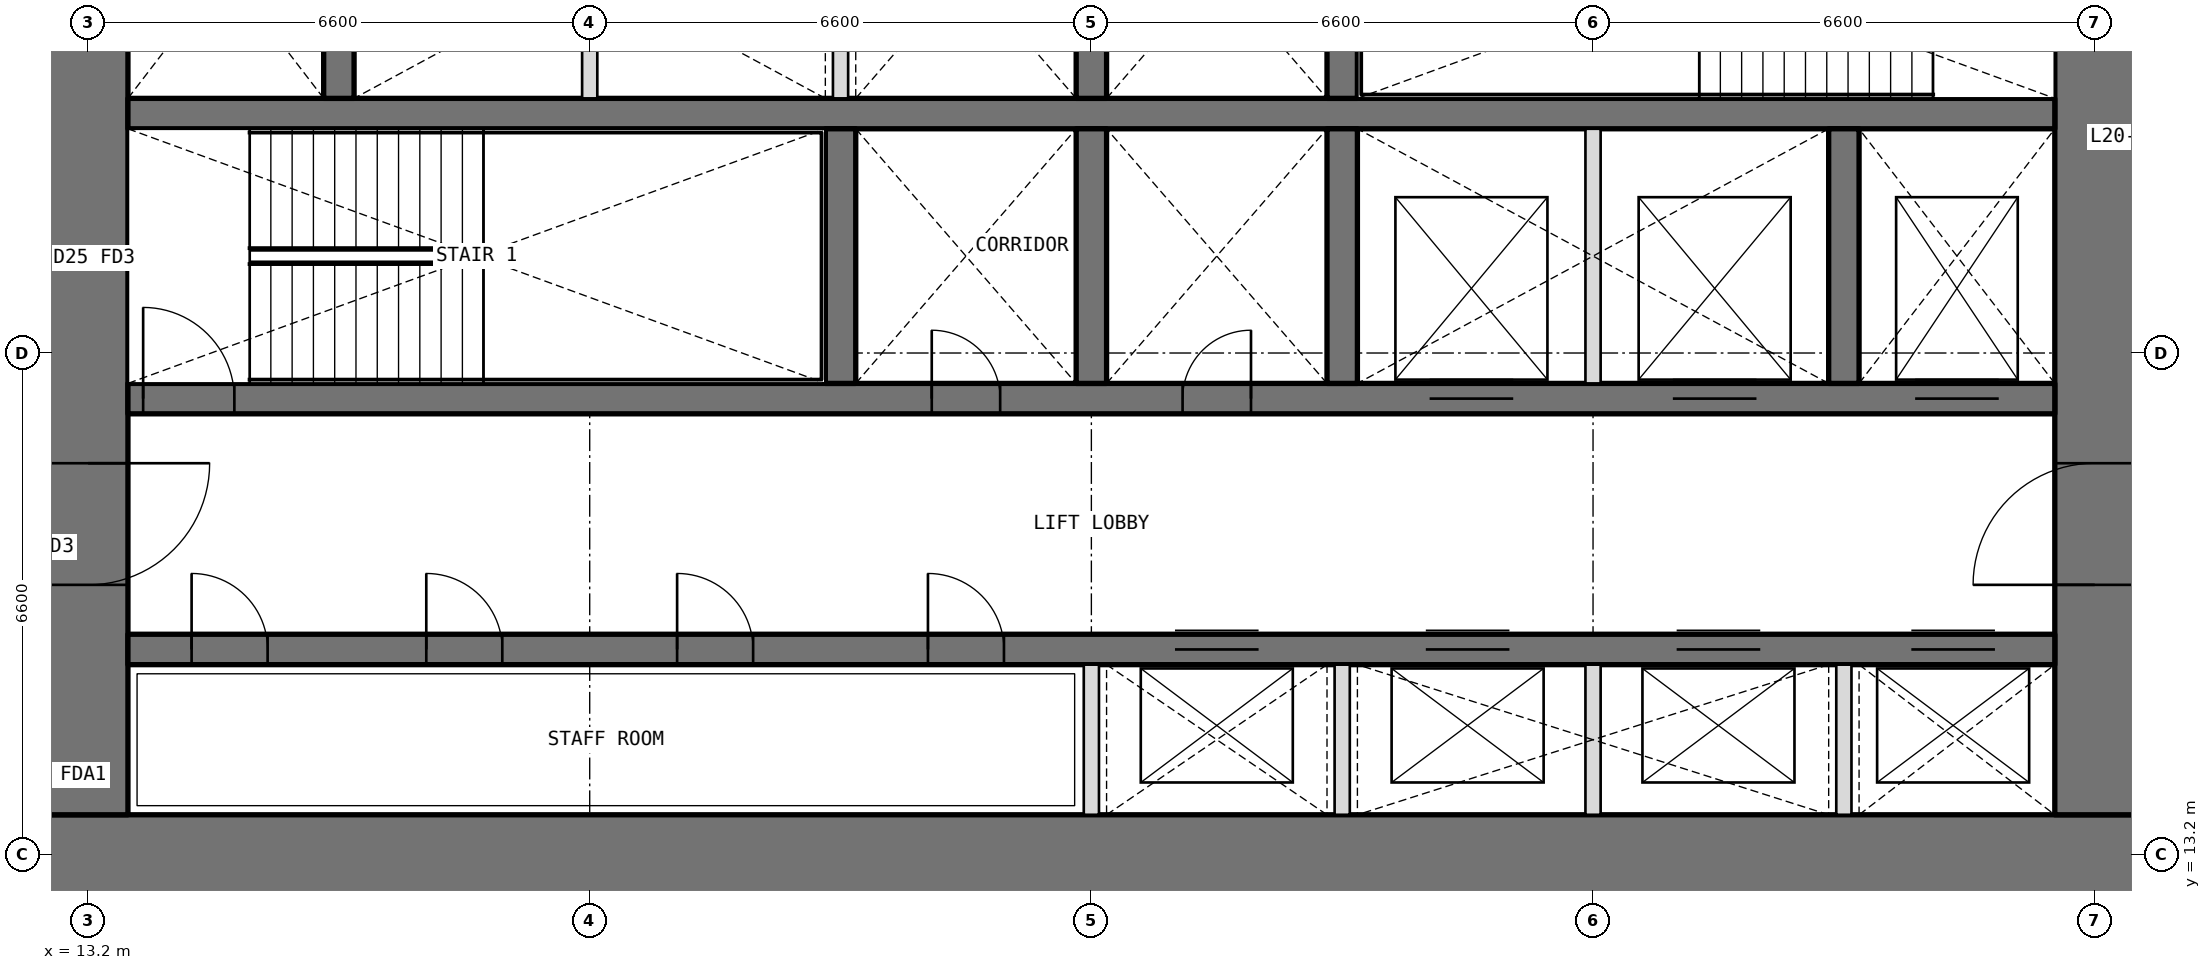
"""IFC4 building model, lengths in metres.
Left out: names, types, materials, properties, quantities, classifications, styles, units other than length and angle.
Written with IfcOpenShell. Run it as: python <this file> out.ifc"""

import sys

from ifc_helpers import new_model, si_unit, direction, frame, frame_2d, origin, place, context, subcontext, project, spatial, rectangle, extrude, element, fill, save


model = new_model("IFC4")
c1 = context("Model", 3, precision=1e-05, world=origin(), true_north=direction((0.0, 1.0)))
c2 = subcontext(c1, "Body", "Model", "MODEL_VIEW")
j1 = project(units=[si_unit("LENGTHUNIT", "METRE"), si_unit("PLANEANGLEUNIT", "RADIAN")], contexts=[c1])
p1 = place(None, origin())
s1 = spatial("IfcSite", under=j1, at=p1, CompositionType="ELEMENT")
p2 = place(p1, origin())
s2 = spatial("IfcBuilding", under=s1, at=p2, CompositionType="ELEMENT")
p3 = place(p2, frame((0.0, 0.0, 90.6)))
s3 = spatial("IfcBuildingStorey", under=s2, at=p3, CompositionType="ELEMENT", Elevation=90.6)
p4 = place(p3, frame((12.675, 13.2, 0.0), z_axis=(0.0, 0.0, 1.0), x_axis=(1.0, 0.0, 0.0)))
e1 = element("IfcWall", 1, at=p4, inside=s3, PredefinedType="SHEAR", context=c2, shape_type="SweptSolid", body=[
    extrude(rectangle(XDim=27.45, YDim=1.05, at=frame_2d((13.725, 0.0))), origin(), (0.0, 0.0, 1.0), 4.2),
])
p5 = place(p3, frame((39.6, 13.725, 0.0), z_axis=(0.0, 0.0, 1.0), x_axis=(0.0, 1.0, 0.0)))
e2 = element("IfcWall", 2, at=p5, inside=s3, PredefinedType="SHEAR", context=c2, shape_type="SweptSolid", body=[
    extrude(rectangle(XDim=18.75, YDim=1.05, at=frame_2d((9.375, 0.0))), origin(), (0.0, 0.0, 1.0), 4.2),
])
p6 = place(p5, frame((3.025, 0.0, 0.0)))
e3 = element("IfcOpeningElement", 3, at=p6, cuts=e2, PredefinedType="OPENING", context=c2, shape_type="SweptSolid", body=[
    extrude(rectangle(XDim=1.6, YDim=2.1, at=frame_2d((0.8, 1.05))), frame((0.0, 0.535, 0.0), z_axis=(0.0, -1.0, 0.0), x_axis=(1.0, 0.0, 0.0)), (0.0, 0.0, 1.0), 1.07),
])
p7 = place(p5, frame((13.825, 0.0, 0.0)))
e4 = element("IfcOpeningElement", 4, at=p7, cuts=e2, PredefinedType="OPENING", context=c2, shape_type="SweptSolid", body=[
    extrude(rectangle(XDim=1.6, YDim=2.1, at=frame_2d((0.8, 1.05))), frame((0.0, 0.535, 0.0), z_axis=(0.0, -1.0, 0.0), x_axis=(1.0, 0.0, 0.0)), (0.0, 0.0, 1.0), 1.07),
])
p8 = place(p3, frame((13.2, 32.475, 0.0), z_axis=(0.0, 0.0, 1.0), x_axis=(0.0, -1.0, 0.0)))
e5 = element("IfcWall", 5, at=p8, inside=s3, PredefinedType="SHEAR", context=c2, shape_type="SweptSolid", body=[
    extrude(rectangle(XDim=18.75, YDim=1.05, at=frame_2d((9.375, 0.0))), origin(), (0.0, 0.0, 1.0), 4.2),
])
p9 = place(p8, frame((14.125, 0.0, 0.0)))
e6 = element("IfcOpeningElement", 6, at=p9, cuts=e5, PredefinedType="OPENING", context=c2, shape_type="SweptSolid", body=[
    extrude(rectangle(XDim=1.6, YDim=2.1, at=frame_2d((0.8, 1.05))), frame((0.0, 0.535, 0.0), z_axis=(0.0, -1.0, 0.0), x_axis=(1.0, 0.0, 0.0)), (0.0, 0.0, 1.0), 1.07),
])
p10 = place(p8, frame((3.325, 0.0, 0.0)))
e7 = element("IfcOpeningElement", 7, at=p10, cuts=e5, PredefinedType="OPENING", context=c2, shape_type="SweptSolid", body=[
    extrude(rectangle(XDim=1.6, YDim=2.1, at=frame_2d((0.8, 1.05))), frame((0.0, 0.535, 0.0), z_axis=(0.0, -1.0, 0.0), x_axis=(1.0, 0.0, 0.0)), (0.0, 0.0, 1.0), 1.07),
])
p11 = place(p3, frame((13.725, 15.9, 0.0), z_axis=(0.0, 0.0, 1.0), x_axis=(1.0, 0.0, 0.0)))
e8 = element("IfcWall", 8, at=p11, inside=s3, PredefinedType="SHEAR", context=c2, shape_type="SweptSolid", body=[
    extrude(rectangle(XDim=25.35, YDim=0.4, at=frame_2d((12.675, 0.0))), origin(), (0.0, 0.0, 1.0), 4.2),
])
p12 = place(p11, frame((0.837, 0.0, 0.0)))
e9 = element("IfcOpeningElement", 9, at=p12, cuts=e8, PredefinedType="OPENING", context=c2, shape_type="SweptSolid", body=[
    extrude(rectangle(XDim=1.0, YDim=2.1, at=frame_2d((0.5, 1.05))), frame((0.0, 0.21, 0.0), z_axis=(0.0, -1.0, 0.0), x_axis=(1.0, 0.0, 0.0)), (0.0, 0.0, 1.0), 0.42),
])
p13 = place(p11, frame((3.925, 0.0, 0.0)))
e10 = element("IfcOpeningElement", 10, at=p13, cuts=e8, PredefinedType="OPENING", context=c2, shape_type="SweptSolid", body=[
    extrude(rectangle(XDim=1.0, YDim=2.1, at=frame_2d((0.5, 1.05))), frame((0.0, 0.21, 0.0), z_axis=(0.0, -1.0, 0.0), x_axis=(1.0, 0.0, 0.0)), (0.0, 0.0, 1.0), 0.42),
])
p14 = place(p11, frame((7.225, 0.0, 0.0)))
e11 = element("IfcOpeningElement", 11, at=p14, cuts=e8, PredefinedType="OPENING", context=c2, shape_type="SweptSolid", body=[
    extrude(rectangle(XDim=1.0, YDim=2.1, at=frame_2d((0.5, 1.05))), frame((0.0, 0.21, 0.0), z_axis=(0.0, -1.0, 0.0), x_axis=(1.0, 0.0, 0.0)), (0.0, 0.0, 1.0), 0.42),
])
p15 = place(p11, frame((10.525, 0.0, 0.0)))
e12 = element("IfcOpeningElement", 12, at=p15, cuts=e8, PredefinedType="OPENING", context=c2, shape_type="SweptSolid", body=[
    extrude(rectangle(XDim=1.0, YDim=2.1, at=frame_2d((0.5, 1.05))), frame((0.0, 0.21, 0.0), z_axis=(0.0, -1.0, 0.0), x_axis=(1.0, 0.0, 0.0)), (0.0, 0.0, 1.0), 0.42),
])
p16 = place(p11, frame((13.775, 0.0, 0.0)))
e13 = element("IfcOpeningElement", 13, at=p16, cuts=e8, PredefinedType="OPENING", context=c2, shape_type="SweptSolid", body=[
    extrude(rectangle(XDim=1.1, YDim=2.1, at=frame_2d((0.55, 1.05))), frame((0.0, 0.21, 0.0), z_axis=(0.0, -1.0, 0.0), x_axis=(1.0, 0.0, 0.0)), (0.0, 0.0, 1.0), 0.42),
])
p17 = place(p11, frame((17.075, 0.0, 0.0)))
e14 = element("IfcOpeningElement", 14, at=p17, cuts=e8, PredefinedType="OPENING", context=c2, shape_type="SweptSolid", body=[
    extrude(rectangle(XDim=1.1, YDim=2.1, at=frame_2d((0.55, 1.05))), frame((0.0, 0.21, 0.0), z_axis=(0.0, -1.0, 0.0), x_axis=(1.0, 0.0, 0.0)), (0.0, 0.0, 1.0), 0.42),
])
p18 = place(p11, frame((20.375, 0.0, 0.0)))
e15 = element("IfcOpeningElement", 15, at=p18, cuts=e8, PredefinedType="OPENING", context=c2, shape_type="SweptSolid", body=[
    extrude(rectangle(XDim=1.1, YDim=2.1, at=frame_2d((0.55, 1.05))), frame((0.0, 0.21, 0.0), z_axis=(0.0, -1.0, 0.0), x_axis=(1.0, 0.0, 0.0)), (0.0, 0.0, 1.0), 0.42),
])
p19 = place(p11, frame((23.462, 0.0, 0.0)))
e16 = element("IfcOpeningElement", 16, at=p19, cuts=e8, PredefinedType="OPENING", context=c2, shape_type="SweptSolid", body=[
    extrude(rectangle(XDim=1.1, YDim=2.1, at=frame_2d((0.55, 1.05))), frame((0.0, 0.21, 0.0), z_axis=(0.0, -1.0, 0.0), x_axis=(1.0, 0.0, 0.0)), (0.0, 0.0, 1.0), 0.42),
])
p20 = place(p3, frame((13.725, 19.2, 0.0), z_axis=(0.0, 0.0, 1.0), x_axis=(1.0, 0.0, 0.0)))
e17 = element("IfcWall", 17, at=p20, inside=s3, PredefinedType="SHEAR", context=c2, shape_type="SweptSolid", body=[
    extrude(rectangle(XDim=25.35, YDim=0.4, at=frame_2d((12.675, 0.0))), origin(), (0.0, 0.0, 1.0), 4.2),
])
p21 = place(p20, frame((10.575, 0.0, 0.0)))
e18 = element("IfcOpeningElement", 18, at=p21, cuts=e17, PredefinedType="OPENING", context=c2, shape_type="SweptSolid", body=[
    extrude(rectangle(XDim=0.9, YDim=2.1, at=frame_2d((0.45, 1.05))), frame((0.0, 0.21, 0.0), z_axis=(0.0, -1.0, 0.0), x_axis=(1.0, 0.0, 0.0)), (0.0, 0.0, 1.0), 0.42),
])
p22 = place(p20, frame((13.875, 0.0, 0.0)))
e19 = element("IfcOpeningElement", 19, at=p22, cuts=e17, PredefinedType="OPENING", context=c2, shape_type="SweptSolid", body=[
    extrude(rectangle(XDim=0.9, YDim=2.1, at=frame_2d((0.45, 1.05))), frame((0.0, 0.21, 0.0), z_axis=(0.0, -1.0, 0.0), x_axis=(1.0, 0.0, 0.0)), (0.0, 0.0, 1.0), 0.42),
])
p23 = place(p20, frame((0.2, 0.0, 0.0)))
e20 = element("IfcOpeningElement", 20, at=p23, cuts=e17, PredefinedType="OPENING", context=c2, shape_type="SweptSolid", body=[
    extrude(rectangle(XDim=1.2, YDim=2.1, at=frame_2d((0.6, 1.05))), frame((0.0, 0.21, 0.0), z_axis=(0.0, -1.0, 0.0), x_axis=(1.0, 0.0, 0.0)), (0.0, 0.0, 1.0), 0.42),
])
p24 = place(p20, frame((23.512, 0.0, 0.0)))
e21 = element("IfcOpeningElement", 21, at=p24, cuts=e17, PredefinedType="OPENING", context=c2, shape_type="SweptSolid", body=[
    extrude(rectangle(XDim=1.1, YDim=2.1, at=frame_2d((0.55, 1.05))), frame((0.0, 0.21, 0.0), z_axis=(0.0, -1.0, 0.0), x_axis=(1.0, 0.0, 0.0)), (0.0, 0.0, 1.0), 0.42),
])
p25 = place(p20, frame((17.125, 0.0, 0.0)))
e22 = element("IfcOpeningElement", 22, at=p25, cuts=e17, PredefinedType="OPENING", context=c2, shape_type="SweptSolid", body=[
    extrude(rectangle(XDim=1.1, YDim=2.1, at=frame_2d((0.55, 1.05))), frame((0.0, 0.21, 0.0), z_axis=(0.0, -1.0, 0.0), x_axis=(1.0, 0.0, 0.0)), (0.0, 0.0, 1.0), 0.42),
])
p26 = place(p20, frame((20.325, 0.0, 0.0)))
e23 = element("IfcOpeningElement", 23, at=p26, cuts=e17, PredefinedType="OPENING", context=c2, shape_type="SweptSolid", body=[
    extrude(rectangle(XDim=1.1, YDim=2.1, at=frame_2d((0.55, 1.05))), frame((0.0, 0.21, 0.0), z_axis=(0.0, -1.0, 0.0), x_axis=(1.0, 0.0, 0.0)), (0.0, 0.0, 1.0), 0.42),
])
p27 = place(p3, frame((13.725, 22.95, 0.0), z_axis=(0.0, 0.0, 1.0), x_axis=(1.0, 0.0, 0.0)))
e24 = element("IfcWall", 24, at=p27, inside=s3, PredefinedType="SHEAR", context=c2, shape_type="SweptSolid", body=[
    extrude(rectangle(XDim=25.35, YDim=0.4, at=frame_2d((12.675, 0.0))), origin(), (0.0, 0.0, 1.0), 4.2),
])
for number, where, z_axis, x_axis in (
    (25, (23.1, 19.4, 0.0), (0.0, 0.0, 1.0), (0.0, 1.0, 0.0)),
    (26, (26.4, 19.4, 0.0), (0.0, 0.0, 1.0), (0.0, 1.0, 0.0)),
    (27, (29.7, 19.4, 0.0), (0.0, 0.0, 1.0), (0.0, 1.0, 0.0)),
    (28, (36.3, 19.4, 0.0), (0.0, 0.0, 1.0), (0.0, 1.0, 0.0)),
    (29, (16.5, 23.15, 0.0), (0.0, 0.0, 1.0), (0.0, 1.0, 0.0)),
    (30, (26.4, 23.15, 0.0), (0.0, 0.0, 1.0), (0.0, 1.0, 0.0)),
    (31, (29.7, 23.15, 0.0), (0.0, 0.0, 1.0), (0.0, 1.0, 0.0)),
):
    element("IfcWall", number, at=place(p3, frame(where, z_axis=z_axis, x_axis=x_axis)), inside=s3, PredefinedType="SHEAR", context=c2, shape_type="SweptSolid", body=[
        extrude(rectangle(XDim=3.35, YDim=0.4, at=frame_2d((1.675, 0.0))), origin(), (0.0, 0.0, 1.0), 4.2),
    ])
for number, where, z_axis, x_axis in (
    (32, (26.4, 13.725, 0.0), (0.0, 0.0, 1.0), (0.0, 1.0, 0.0)),
    (33, (29.7, 13.725, 0.0), (0.0, 0.0, 1.0), (0.0, 1.0, 0.0)),
    (34, (33.0, 13.725, 0.0), (0.0, 0.0, 1.0), (0.0, 1.0, 0.0)),
    (35, (36.3, 13.725, 0.0), (0.0, 0.0, 1.0), (0.0, 1.0, 0.0)),
):
    element("IfcWall", number, at=place(p3, frame(where, z_axis=z_axis, x_axis=x_axis)), inside=s3, PredefinedType="PARTITIONING", context=c2, shape_type="SweptSolid", body=[
        extrude(rectangle(XDim=1.975, YDim=0.2, at=frame_2d((0.987, 0.0))), origin(), (0.0, 0.0, 1.0), 4.2),
    ])
for number, where, z_axis, x_axis in (
    (36, (33.0, 19.4, 0.0), (0.0, 0.0, 1.0), (0.0, 1.0, 0.0)),
    (37, (19.8, 23.15, 0.0), (0.0, 0.0, 1.0), (0.0, 1.0, 0.0)),
    (38, (23.1, 23.15, 0.0), (0.0, 0.0, 1.0), (0.0, 1.0, 0.0)),
):
    element("IfcWall", number, at=place(p3, frame(where, z_axis=z_axis, x_axis=x_axis)), inside=s3, PredefinedType="PARTITIONING", context=c2, shape_type="SweptSolid", body=[
        extrude(rectangle(XDim=3.35, YDim=0.2, at=frame_2d((1.675, 0.0))), origin(), (0.0, 0.0, 1.0), 4.2),
    ])
p28 = place(p21, origin())
e39 = element("IfcDoor", 39, at=p28, inside=s3, OperationType="SINGLE_SWING_LEFT", PredefinedType="DOOR", context=c2, shape_type="SweptSolid", body=[
    extrude(rectangle(XDim=0.9, YDim=2.1, at=frame_2d((0.45, 1.05))), frame((0.0, 0.025, 0.0), z_axis=(0.0, -1.0, 0.0), x_axis=(1.0, 0.0, 0.0)), (0.0, 0.0, 1.0), 0.05),
])
fill(e18, e39)
p29 = place(p22, origin())
e40 = element("IfcDoor", 40, at=p29, inside=s3, OperationType="SINGLE_SWING_RIGHT", PredefinedType="DOOR", context=c2, shape_type="SweptSolid", body=[
    extrude(rectangle(XDim=0.9, YDim=2.1, at=frame_2d((0.45, 1.05))), frame((0.0, 0.025, 0.0), z_axis=(0.0, -1.0, 0.0), x_axis=(1.0, 0.0, 0.0)), (0.0, 0.0, 1.0), 0.05),
])
fill(e19, e40)
p30 = place(p12, origin())
e41 = element("IfcDoor", 41, at=p30, inside=s3, OperationType="SINGLE_SWING_LEFT", PredefinedType="DOOR", context=c2, shape_type="SweptSolid", body=[
    extrude(rectangle(XDim=1.0, YDim=2.1, at=frame_2d((0.5, 1.05))), frame((0.0, 0.025, 0.0), z_axis=(0.0, -1.0, 0.0), x_axis=(1.0, 0.0, 0.0)), (0.0, 0.0, 1.0), 0.05),
])
fill(e9, e41)
p31 = place(p13, origin())
e42 = element("IfcDoor", 42, at=p31, inside=s3, OperationType="SINGLE_SWING_LEFT", PredefinedType="DOOR", context=c2, shape_type="SweptSolid", body=[
    extrude(rectangle(XDim=1.0, YDim=2.1, at=frame_2d((0.5, 1.05))), frame((0.0, 0.025, 0.0), z_axis=(0.0, -1.0, 0.0), x_axis=(1.0, 0.0, 0.0)), (0.0, 0.0, 1.0), 0.05),
])
fill(e10, e42)
p32 = place(p14, origin())
e43 = element("IfcDoor", 43, at=p32, inside=s3, OperationType="SINGLE_SWING_LEFT", PredefinedType="DOOR", context=c2, shape_type="SweptSolid", body=[
    extrude(rectangle(XDim=1.0, YDim=2.1, at=frame_2d((0.5, 1.05))), frame((0.0, 0.025, 0.0), z_axis=(0.0, -1.0, 0.0), x_axis=(1.0, 0.0, 0.0)), (0.0, 0.0, 1.0), 0.05),
])
fill(e11, e43)
p33 = place(p15, origin())
e44 = element("IfcDoor", 44, at=p33, inside=s3, OperationType="SINGLE_SWING_LEFT", PredefinedType="DOOR", context=c2, shape_type="SweptSolid", body=[
    extrude(rectangle(XDim=1.0, YDim=2.1, at=frame_2d((0.5, 1.05))), frame((0.0, 0.025, 0.0), z_axis=(0.0, -1.0, 0.0), x_axis=(1.0, 0.0, 0.0)), (0.0, 0.0, 1.0), 0.05),
])
fill(e12, e44)
p34 = place(p23, origin())
e45 = element("IfcDoor", 45, at=p34, inside=s3, OperationType="SINGLE_SWING_LEFT", PredefinedType="DOOR", context=c2, shape_type="SweptSolid", body=[
    extrude(rectangle(XDim=1.2, YDim=2.1, at=frame_2d((0.6, 1.05))), frame((0.0, 0.025, 0.0), z_axis=(0.0, -1.0, 0.0), x_axis=(1.0, 0.0, 0.0)), (0.0, 0.0, 1.0), 0.05),
])
fill(e20, e45)
p35 = place(p9, origin())
e46 = element("IfcDoor", 46, at=p35, inside=s3, OperationType="DOUBLE_DOOR_DOUBLE_SWING", PredefinedType="DOOR", context=c2, shape_type="SweptSolid", body=[
    extrude(rectangle(XDim=1.6, YDim=2.1, at=frame_2d((0.8, 1.05))), frame((0.0, 0.025, 0.0), z_axis=(0.0, -1.0, 0.0), x_axis=(1.0, 0.0, 0.0)), (0.0, 0.0, 1.0), 0.05),
])
fill(e6, e46)
p36 = place(p6, origin())
e47 = element("IfcDoor", 47, at=p36, inside=s3, OperationType="DOUBLE_DOOR_DOUBLE_SWING", PredefinedType="DOOR", context=c2, shape_type="SweptSolid", body=[
    extrude(rectangle(XDim=1.6, YDim=2.1, at=frame_2d((0.8, 1.05))), frame((0.0, 0.025, 0.0), z_axis=(0.0, -1.0, 0.0), x_axis=(1.0, 0.0, 0.0)), (0.0, 0.0, 1.0), 0.05),
])
fill(e3, e47)
p37 = place(p16, origin())
e48 = element("IfcDoor", 48, at=p37, inside=s3, OperationType="DOUBLE_DOOR_SLIDING", PredefinedType="DOOR", context=c2, shape_type="SweptSolid", body=[
    extrude(rectangle(XDim=1.1, YDim=2.1, at=frame_2d((0.55, 1.05))), frame((0.0, 0.025, 0.0), z_axis=(0.0, -1.0, 0.0), x_axis=(1.0, 0.0, 0.0)), (0.0, 0.0, 1.0), 0.05),
])
fill(e13, e48)
p38 = place(p17, origin())
e49 = element("IfcDoor", 49, at=p38, inside=s3, OperationType="DOUBLE_DOOR_SLIDING", PredefinedType="DOOR", context=c2, shape_type="SweptSolid", body=[
    extrude(rectangle(XDim=1.1, YDim=2.1, at=frame_2d((0.55, 1.05))), frame((0.0, 0.025, 0.0), z_axis=(0.0, -1.0, 0.0), x_axis=(1.0, 0.0, 0.0)), (0.0, 0.0, 1.0), 0.05),
])
fill(e14, e49)
p39 = place(p18, origin())
e50 = element("IfcDoor", 50, at=p39, inside=s3, OperationType="DOUBLE_DOOR_SLIDING", PredefinedType="DOOR", context=c2, shape_type="SweptSolid", body=[
    extrude(rectangle(XDim=1.1, YDim=2.1, at=frame_2d((0.55, 1.05))), frame((0.0, 0.025, 0.0), z_axis=(0.0, -1.0, 0.0), x_axis=(1.0, 0.0, 0.0)), (0.0, 0.0, 1.0), 0.05),
])
fill(e15, e50)
p40 = place(p19, origin())
e51 = element("IfcDoor", 51, at=p40, inside=s3, OperationType="DOUBLE_DOOR_SLIDING", PredefinedType="DOOR", context=c2, shape_type="SweptSolid", body=[
    extrude(rectangle(XDim=1.1, YDim=2.1, at=frame_2d((0.55, 1.05))), frame((0.0, 0.025, 0.0), z_axis=(0.0, -1.0, 0.0), x_axis=(1.0, 0.0, 0.0)), (0.0, 0.0, 1.0), 0.05),
])
fill(e16, e51)
p41 = place(p24, origin())
e52 = element("IfcDoor", 52, at=p41, inside=s3, OperationType="DOUBLE_DOOR_SLIDING", PredefinedType="DOOR", context=c2, shape_type="SweptSolid", body=[
    extrude(rectangle(XDim=1.1, YDim=2.1, at=frame_2d((0.55, 1.05))), frame((0.0, 0.025, 0.0), z_axis=(0.0, -1.0, 0.0), x_axis=(1.0, 0.0, 0.0)), (0.0, 0.0, 1.0), 0.05),
])
fill(e21, e52)
p42 = place(p25, origin())
e53 = element("IfcDoor", 53, at=p42, inside=s3, OperationType="DOUBLE_DOOR_SLIDING", PredefinedType="DOOR", context=c2, shape_type="SweptSolid", body=[
    extrude(rectangle(XDim=1.1, YDim=2.1, at=frame_2d((0.55, 1.05))), frame((0.0, 0.025, 0.0), z_axis=(0.0, -1.0, 0.0), x_axis=(1.0, 0.0, 0.0)), (0.0, 0.0, 1.0), 0.05),
])
fill(e22, e53)
p43 = place(p26, origin())
e54 = element("IfcDoor", 54, at=p43, inside=s3, OperationType="DOUBLE_DOOR_SLIDING", PredefinedType="DOOR", context=c2, shape_type="SweptSolid", body=[
    extrude(rectangle(XDim=1.1, YDim=2.1, at=frame_2d((0.55, 1.05))), frame((0.0, 0.025, 0.0), z_axis=(0.0, -1.0, 0.0), x_axis=(1.0, 0.0, 0.0)), (0.0, 0.0, 1.0), 0.05),
])
fill(e23, e54)
save(model, sys.argv[1])
